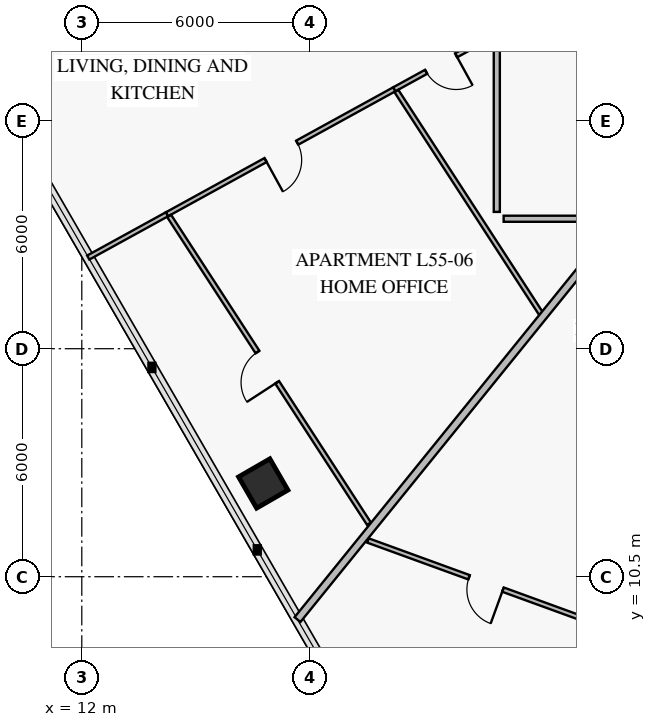
"""IFC4 building model, lengths in metres.
Left out: names, types, materials, properties, quantities, classifications, styles, units other than length and angle.
Written with IfcOpenShell. Run it as: python <this file> out.ifc"""

import sys

from ifc_helpers import new_model, si_unit, direction, frame, frame_2d, origin, origin_2d, place, context, subcontext, project, spatial, rectangle, extrude, element, fill, save


model = new_model("IFC4")
c1 = context("Model", 3, precision=1e-05, world=origin(), true_north=direction((0.0, 1.0)))
c2 = subcontext(c1, "Body", "Model", "MODEL_VIEW")
j1 = project(units=[si_unit("LENGTHUNIT", "METRE"), si_unit("PLANEANGLEUNIT", "RADIAN")], contexts=[c1])
p1 = place(None, origin())
s1 = spatial("IfcSite", under=j1, at=p1, CompositionType="ELEMENT")
p2 = place(p1, origin())
s2 = spatial("IfcBuilding", under=s1, at=p2, CompositionType="ELEMENT")
p3 = place(p2, frame((0.0, 0.0, 218.8)))
s3 = spatial("IfcBuildingStorey", under=s2, at=p3, CompositionType="ELEMENT", Elevation=218.8)
p4 = place(p3, frame((16.774, 12.953, 0.0), z_axis=(0.0, 0.0, 1.0), x_axis=(0.5, -0.866025403784, 0.0)))
e1 = element("IfcColumn", 1, at=p4, inside=s3, PredefinedType="COLUMN", context=c2, shape_type="SweptSolid", body=[
    extrude(rectangle(XDim=0.95, YDim=0.95, at=origin_2d()), origin(), (0.0, 0.0, 1.0), 3.55),
])
p5 = place(p3, frame((22.35, 24.496, 0.0), z_axis=(0.0, 0.0, 1.0), x_axis=(-0.876309206798, -0.481749077924, 0.0)))
e2 = element("IfcWall", 2, at=p5, inside=s3, PredefinedType="PARTITIONING", context=c2, shape_type="SweptSolid", body=[
    extrude(rectangle(XDim=2.43, YDim=0.12, at=frame_2d((1.215, 0.0))), origin(), (0.0, 0.0, 1.0), 3.55),
])
p6 = place(p5, frame((0.571, 0.0, 0.0)))
e3 = element("IfcOpeningElement", 3, at=p6, cuts=e2, PredefinedType="OPENING", context=c2, shape_type="SweptSolid", body=[
    extrude(rectangle(XDim=0.9, YDim=2.1, at=frame_2d((0.45, 1.05))), frame((0.0, 0.072, 0.0), z_axis=(0.0, -1.0, 0.0), x_axis=(1.0, 0.0, 0.0)), (0.0, 0.0, 1.0), 0.144),
])
p7 = place(p3, frame((20.22, 23.325, 0.0), z_axis=(0.0, 0.0, 1.0), x_axis=(-0.876311810277, -0.481744342124, 0.0)))
e4 = element("IfcWall", 4, at=p7, inside=s3, PredefinedType="PARTITIONING", context=c2, shape_type="SweptSolid", body=[
    extrude(rectangle(XDim=6.825, YDim=0.12, at=frame_2d((3.413, 0.0))), origin(), (0.0, 0.0, 1.0), 3.15),
])
p8 = place(p7, frame((2.912, 0.0, 0.0)))
e5 = element("IfcOpeningElement", 5, at=p8, cuts=e4, PredefinedType="OPENING", context=c2, shape_type="SweptSolid", body=[
    extrude(rectangle(XDim=0.95, YDim=2.1, at=frame_2d((0.475, 1.05))), frame((0.0, 0.072, 0.0), z_axis=(0.0, -1.0, 0.0), x_axis=(1.0, 0.0, 0.0)), (0.0, 0.0, 1.0), 0.144),
])
p9 = place(p3, frame((14.299, 19.992, 0.0), z_axis=(0.0, 0.0, 1.0), x_axis=(0.544639863527, -0.838670029903, 0.0)))
e6 = element("IfcWall", 6, at=p9, inside=s3, PredefinedType="PARTITIONING", context=c2, shape_type="SweptSolid", body=[
    extrude(rectangle(XDim=9.654, YDim=0.12, at=frame_2d((4.827, 0.0))), origin(), (0.0, 0.0, 1.0), 2.9),
])
p10 = place(p9, frame((4.268, 0.0, 0.0)))
e7 = element("IfcOpeningElement", 7, at=p10, cuts=e6, PredefinedType="OPENING", context=c2, shape_type="SweptSolid", body=[
    extrude(rectangle(XDim=0.95, YDim=2.1, at=frame_2d((0.475, 1.05))), frame((0.0, 0.072, 0.0), z_axis=(0.0, -1.0, 0.0), x_axis=(1.0, 0.0, 0.0)), (0.0, 0.0, 1.0), 0.144),
])
p11 = place(p3, frame((19.529, 11.454, 0.0), z_axis=(0.0, 0.0, 1.0), x_axis=(0.939692077738, -0.342021635334, 0.0)))
e8 = element("IfcWall", 8, at=p11, inside=s3, PredefinedType="PARTITIONING", context=c2, shape_type="SweptSolid", body=[
    extrude(rectangle(XDim=6.614, YDim=0.12, at=frame_2d((3.307, 0.0))), origin(), (0.0, 0.0, 1.0), 2.87),
])
p12 = place(p11, frame((2.832, 0.0, 0.0)))
e9 = element("IfcOpeningElement", 9, at=p12, cuts=e8, PredefinedType="OPENING", context=c2, shape_type="SweptSolid", body=[
    extrude(rectangle(XDim=0.95, YDim=2.1, at=frame_2d((0.475, 1.05))), frame((0.0, 0.072, 0.0), z_axis=(0.0, -1.0, 0.0), x_axis=(1.0, 0.0, 0.0)), (0.0, 0.0, 1.0), 0.144),
])
p13 = place(p3, frame((14.24, 20.037, 0.0), z_axis=(0.0, 0.0, 1.0), x_axis=(-0.876298822975, -0.481767965781, 0.0)))
e10 = element("IfcWall", 10, at=p13, inside=s3, PredefinedType="PARTITIONING", context=c2, shape_type="SweptSolid", body=[
    extrude(rectangle(XDim=2.362, YDim=0.12, at=frame_2d((1.181, 0.0))), origin(), (0.0, 0.0, 1.0), 2.87),
])
p14 = place(p3, frame((20.279, 23.28, 0.0), z_axis=(0.0, 0.0, 1.0), x_axis=(0.544627082445, -0.838678329914, 0.0)))
e11 = element("IfcWall", 11, at=p14, inside=s3, PredefinedType="PARTITIONING", context=c2, shape_type="SweptSolid", body=[
    extrude(rectangle(XDim=7.008, YDim=0.12, at=frame_2d((3.504, 0.0))), origin(), (0.0, 0.0, 1.0), 2.9),
])
p15 = place(p3, frame((26.25, 19.96, 0.0), z_axis=(0.0, 0.0, 1.0), x_axis=(-0.629325545389, -0.777141787527, 0.0)))
e12 = element("IfcWall", 12, at=p15, inside=s3, PredefinedType="PARTITIONING", context=c2, shape_type="SweptSolid", body=[
    extrude(rectangle(XDim=13.625, YDim=0.2, at=frame_2d((6.812, 0.0))), origin(), (0.0, 0.0, 1.0), 2.87),
])
p16 = place(p3, frame((22.92, 24.732, 0.0), z_axis=(0.0, 0.0, 1.0), x_axis=(0.0, -1.0, 0.0)))
e13 = element("IfcWall", 13, at=p16, inside=s3, PredefinedType="PARTITIONING", context=c2, shape_type="SweptSolid", body=[
    extrude(rectangle(XDim=4.632, YDim=0.16, at=frame_2d((2.316, 0.0))), origin(), (0.0, 0.0, 1.0), 3.55),
])
p17 = place(p3, frame((23.1, 19.92, 0.0), z_axis=(0.0, 0.0, 1.0), x_axis=(1.0, 0.0, 0.0)))
e14 = element("IfcWall", 14, at=p17, inside=s3, PredefinedType="PARTITIONING", context=c2, shape_type="SweptSolid", body=[
    extrude(rectangle(XDim=2.916, YDim=0.16, at=frame_2d((1.458, 0.0))), origin(), (0.0, 0.0, 1.0), 2.9),
])
p18 = place(p6, origin())
e15 = element("IfcDoor", 15, at=p18, inside=s3, OperationType="SINGLE_SWING_LEFT", PredefinedType="DOOR", context=c2, shape_type="SweptSolid", body=[
    extrude(rectangle(XDim=0.9, YDim=2.1, at=frame_2d((0.45, 1.05))), frame((0.0, 0.025, 0.0), z_axis=(0.0, -1.0, 0.0), x_axis=(1.0, 0.0, 0.0)), (0.0, 0.0, 1.0), 0.05),
])
fill(e3, e15)
p19 = place(p8, origin())
e16 = element("IfcDoor", 16, at=p19, inside=s3, OperationType="SINGLE_SWING_RIGHT", PredefinedType="DOOR", context=c2, shape_type="SweptSolid", body=[
    extrude(rectangle(XDim=0.95, YDim=2.1, at=frame_2d((0.475, 1.05))), frame((0.0, 0.025, 0.0), z_axis=(0.0, -1.0, 0.0), x_axis=(1.0, 0.0, 0.0)), (0.0, 0.0, 1.0), 0.05),
])
fill(e5, e16)
p20 = place(p10, frame((0.95, 0.0, 0.0), z_axis=(0.0, 0.0, 1.0), x_axis=(-1.0, 0.0, 0.0)))
e17 = element("IfcDoor", 17, at=p20, inside=s3, OperationType="SINGLE_SWING_LEFT", PredefinedType="DOOR", context=c2, shape_type="SweptSolid", body=[
    extrude(rectangle(XDim=0.95, YDim=2.1, at=frame_2d((0.475, 1.05))), frame((0.0, 0.025, 0.0), z_axis=(0.0, -1.0, 0.0), x_axis=(1.0, 0.0, 0.0)), (0.0, 0.0, 1.0), 0.05),
])
fill(e7, e17)
p21 = place(p12, frame((0.95, 0.0, 0.0), z_axis=(0.0, 0.0, 1.0), x_axis=(-1.0, 0.0, 0.0)))
e18 = element("IfcDoor", 18, at=p21, inside=s3, OperationType="SINGLE_SWING_LEFT", PredefinedType="DOOR", context=c2, shape_type="SweptSolid", body=[
    extrude(rectangle(XDim=0.95, YDim=2.1, at=frame_2d((0.475, 1.05))), frame((0.0, 0.025, 0.0), z_axis=(0.0, -1.0, 0.0), x_axis=(1.0, 0.0, 0.0)), (0.0, 0.0, 1.0), 0.05),
])
fill(e9, e18)
save(model, sys.argv[1])
